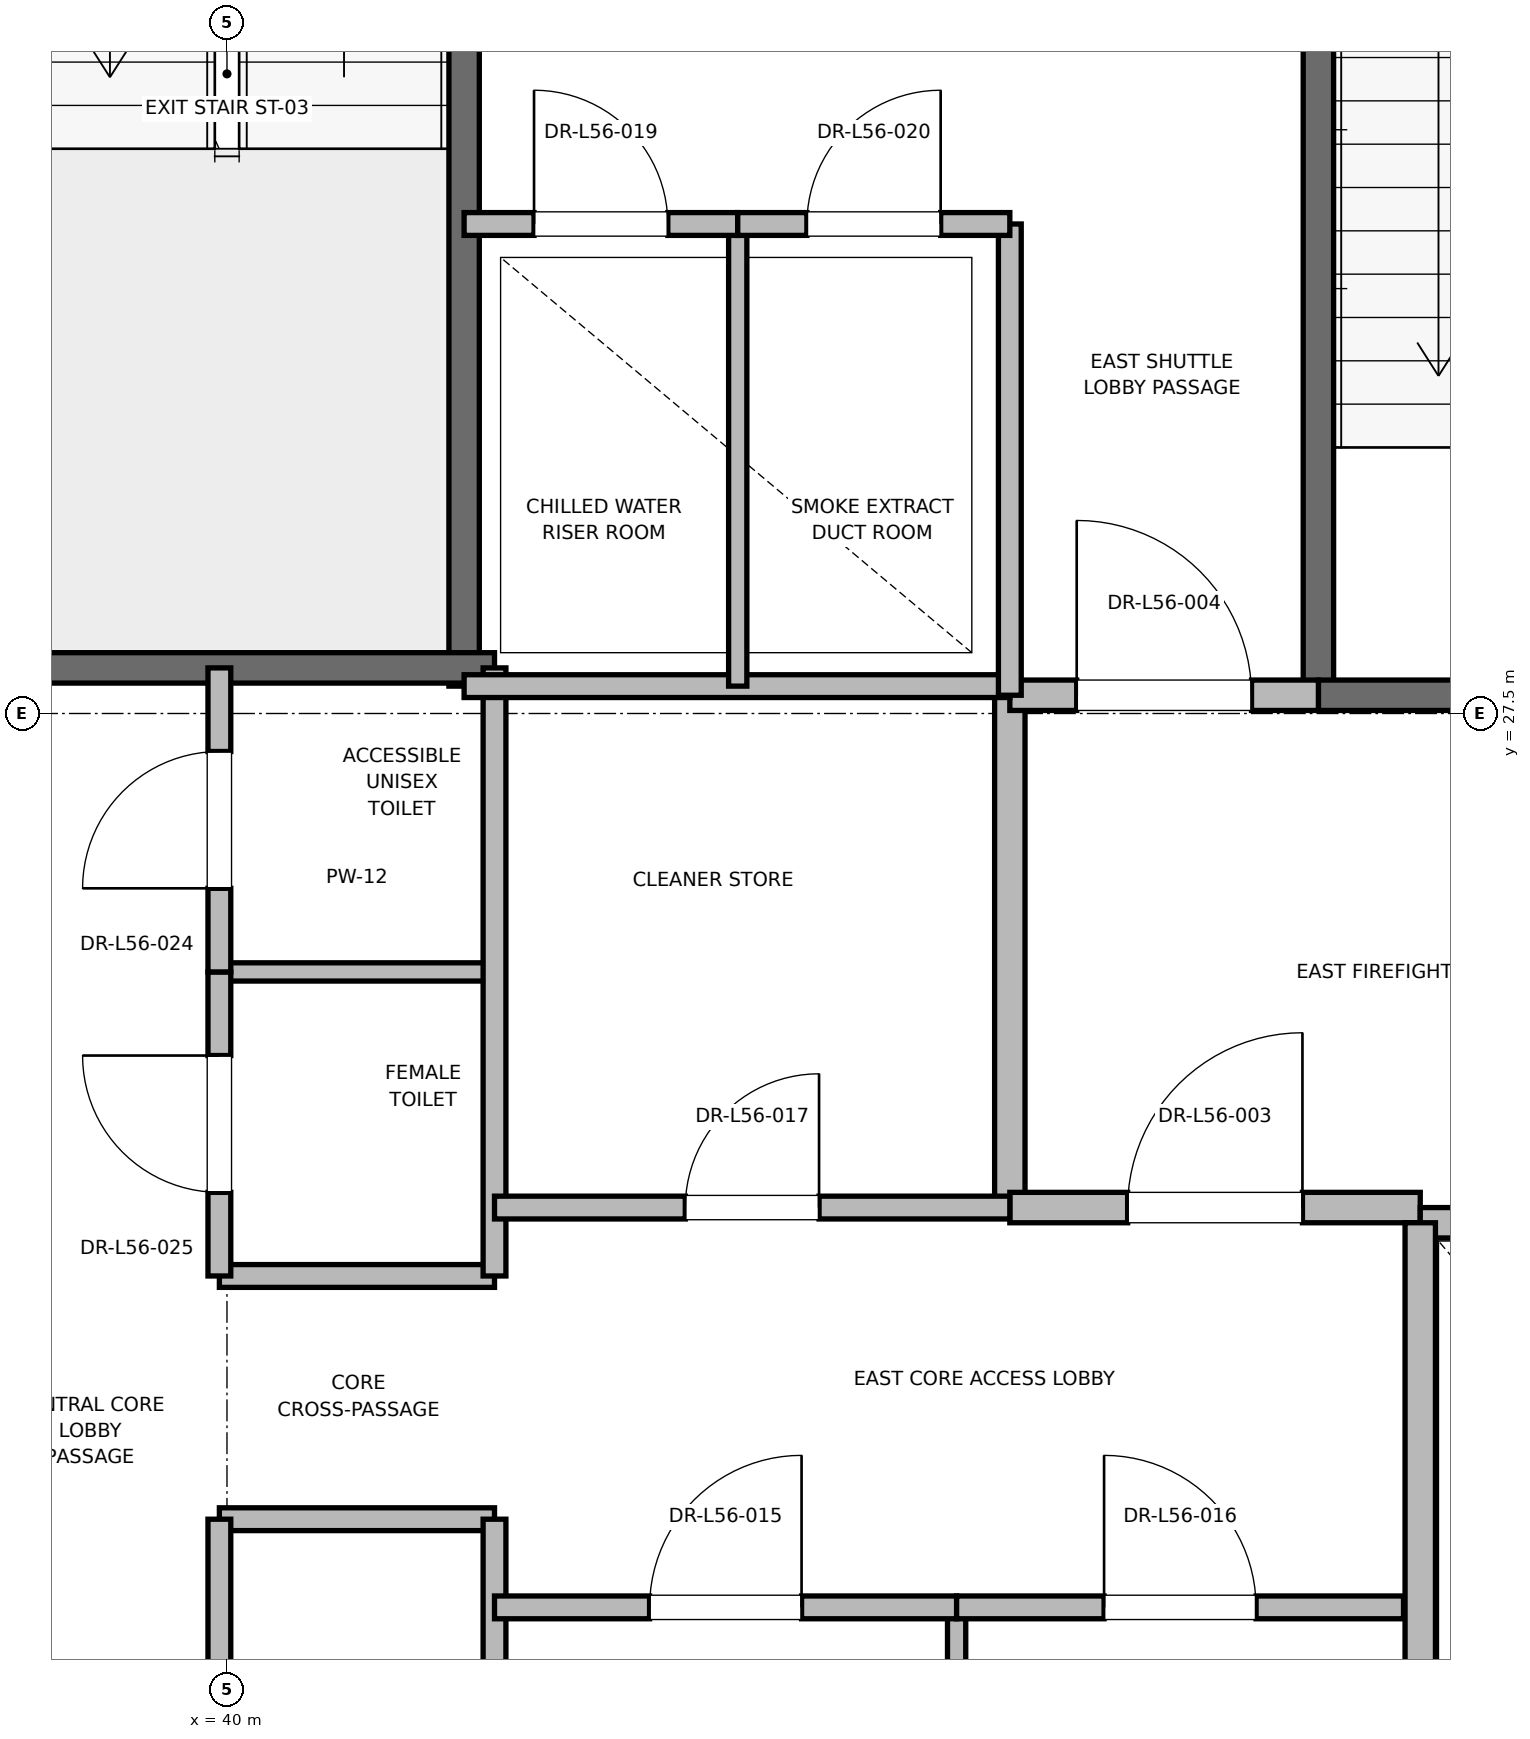
"""IFC4 building model, lengths in metres.
Left out: names, types, materials, properties, quantities, classifications, styles, units other than length and angle.
Written with IfcOpenShell. Run it as: python <this file> out.ifc"""

import sys

from ifc_helpers import new_model, si_unit, direction, frame, frame_2d, origin, place, context, subcontext, project, spatial, rectangle, extrude, element, fill, save


model = new_model("IFC4")
c1 = context("Model", 3, precision=1e-05, world=origin(), true_north=direction((0.0, 1.0)))
c2 = subcontext(c1, "Body", "Model", "MODEL_VIEW")
j1 = project(units=[si_unit("LENGTHUNIT", "METRE"), si_unit("PLANEANGLEUNIT", "RADIAN")], contexts=[c1])
p1 = place(None, origin())
s1 = spatial("IfcSite", under=j1, at=p1, CompositionType="ELEMENT")
p2 = place(p1, origin())
s2 = spatial("IfcBuilding", under=s1, at=p2, CompositionType="ELEMENT")
p3 = place(p2, frame((0.0, 0.0, 243.2)))
s3 = spatial("IfcBuildingStorey", under=s2, at=p3, CompositionType="ELEMENT", Elevation=243.2)
p4 = place(p3, frame((47.18, 27.62, 0.0), z_axis=(0.0, 0.0, 1.0), x_axis=(0.0, 1.0, 0.0)))
e1 = element("IfcWall", 1, at=p4, inside=s3, PredefinedType="SOLIDWALL", context=c2, shape_type="SweptSolid", body=[
    extrude(rectangle(XDim=8.18, YDim=0.2, at=frame_2d((4.09, 0.0))), origin(), (0.0, 0.0, 1.0), 3.785),
])
p5 = place(p3, frame((47.18, 27.62, 0.0), z_axis=(0.0, 0.0, 1.0), x_axis=(1.0, 0.0, 0.0)))
e2 = element("IfcWall", 2, at=p5, inside=s3, PredefinedType="SOLIDWALL", context=c2, shape_type="SweptSolid", body=[
    extrude(rectangle(XDim=3.12, YDim=0.2, at=frame_2d((1.56, 0.0))), origin(), (0.0, 0.0, 1.0), 3.785),
])
p6 = place(p5, frame((1.01, 0.0, 0.0)))
e3 = element("IfcOpeningElement", 3, at=p6, cuts=e2, PredefinedType="OPENING", context=c2, shape_type="SweptSolid", body=[
    extrude(rectangle(XDim=1.1, YDim=2.15, at=frame_2d((0.55, 1.075))), frame((0.0, 0.1, 0.0), z_axis=(0.0, -1.0, 0.0), x_axis=(1.0, 0.0, 0.0)), (0.0, 0.0, 1.0), 0.2),
])
p7 = place(p3, frame((41.56, 27.68, 0.0), z_axis=(0.0, 0.0, 1.0), x_axis=(0.0, 1.0, 0.0)))
e4 = element("IfcWall", 4, at=p7, inside=s3, PredefinedType="SOLIDWALL", context=c2, shape_type="SweptSolid", body=[
    extrude(rectangle(XDim=8.57, YDim=0.2, at=frame_2d((4.285, 0.0))), origin(), (0.0, 0.0, 1.0), 3.785),
])
p8 = place(p3, frame((38.44, 27.8, 0.0), z_axis=(0.0, 0.0, 1.0), x_axis=(1.0, 0.0, 0.0)))
e5 = element("IfcWall", 5, at=p8, inside=s3, PredefinedType="SOLIDWALL", context=c2, shape_type="SweptSolid", body=[
    extrude(rectangle(XDim=3.32, YDim=0.2, at=frame_2d((1.66, 0.0))), origin(), (0.0, 0.0, 1.0), 3.785),
])
p9 = place(p3, frame((45.15, 24.25, 0.0), z_axis=(0.0, 0.0, 1.0), x_axis=(0.0, 1.0, 0.0)))
e6 = element("IfcWall", 6, at=p9, inside=s3, PredefinedType="PARTITIONING", context=c2, shape_type="SweptSolid", body=[
    extrude(rectangle(XDim=3.37, YDim=0.2, at=frame_2d((1.685, 0.0))), origin(), (0.0, 0.0, 1.0), 3.785),
])
p10 = place(p3, frame((45.15, 24.25, 0.0), z_axis=(0.0, 0.0, 1.0), x_axis=(1.0, 0.0, 0.0)))
e7 = element("IfcWall", 7, at=p10, inside=s3, PredefinedType="PARTITIONING", context=c2, shape_type="SweptSolid", body=[
    extrude(rectangle(XDim=2.7, YDim=0.2, at=frame_2d((1.35, 0.0))), origin(), (0.0, 0.0, 1.0), 3.785),
])
p11 = place(p10, frame((0.775, 0.0, 0.0)))
e8 = element("IfcOpeningElement", 8, at=p11, cuts=e7, PredefinedType="OPENING", context=c2, shape_type="SweptSolid", body=[
    extrude(rectangle(XDim=1.15, YDim=2.2, at=frame_2d((0.575, 1.1))), frame((0.0, 0.1, 0.0), z_axis=(0.0, -1.0, 0.0), x_axis=(1.0, 0.0, 0.0)), (0.0, 0.0, 1.0), 0.2),
])
p12 = place(p3, frame((45.15, 27.62, 0.0), z_axis=(0.0, 0.0, 1.0), x_axis=(1.0, 0.0, 0.0)))
e9 = element("IfcWall", 9, at=p12, inside=s3, PredefinedType="PARTITIONING", context=c2, shape_type="SweptSolid", body=[
    extrude(rectangle(XDim=2.03, YDim=0.2, at=frame_2d((1.015, 0.0))), origin(), (0.0, 0.0, 1.0), 3.785),
])
p13 = place(p12, frame((0.44, 0.0, 0.0)))
e10 = element("IfcOpeningElement", 10, at=p13, cuts=e9, PredefinedType="OPENING", context=c2, shape_type="SweptSolid", body=[
    extrude(rectangle(XDim=1.15, YDim=2.2, at=frame_2d((0.575, 1.1))), frame((0.0, 0.1, 0.0), z_axis=(0.0, -1.0, 0.0), x_axis=(1.0, 0.0, 0.0)), (0.0, 0.0, 1.0), 0.2),
])
p14 = place(p3, frame((50.45, 24.15, 0.0), z_axis=(0.0, 0.0, 1.0), x_axis=(-1.0, 0.0, 0.0)))
e11 = element("IfcWall", 11, at=p14, inside=s3, PredefinedType="SOLIDWALL", context=c2, shape_type="SweptSolid", body=[
    extrude(rectangle(XDim=2.6, YDim=0.2, at=frame_2d((1.3, 0.0))), origin(), (0.0, 0.0, 1.0), 2.865),
])
p15 = place(p14, frame((0.75, 0.0, 0.0)))
e12 = element("IfcOpeningElement", 12, at=p15, cuts=e11, PredefinedType="OPENING", context=c2, shape_type="SweptSolid", body=[
    extrude(rectangle(XDim=1.1, YDim=2.2, at=frame_2d((0.55, 1.1))), frame((0.0, 0.1, 0.0), z_axis=(0.0, -1.0, 0.0), x_axis=(1.0, 0.0, 0.0)), (0.0, 0.0, 1.0), 0.2),
])
p16 = place(p3, frame((47.85, 24.15, 0.0), z_axis=(0.0, 0.0, 1.0), x_axis=(0.0, -1.0, 0.0)))
e13 = element("IfcWall", 13, at=p16, inside=s3, PredefinedType="SOLIDWALL", context=c2, shape_type="SweptSolid", body=[
    extrude(rectangle(XDim=3.0, YDim=0.2, at=frame_2d((1.5, 0.0))), origin(), (0.0, 0.0, 1.0), 3.785),
])
for number, where, z_axis, x_axis in (
    (14, (39.95, 22.2, 0.0), (0.0, 0.0, 1.0), (1.0, 0.0, 0.0)),
    (15, (39.95, 23.8, 0.0), (0.0, 0.0, 1.0), (1.0, 0.0, 0.0)),
):
    element("IfcWall", number, at=place(p3, frame(where, z_axis=z_axis, x_axis=x_axis)), inside=s3, PredefinedType="PARTITIONING", context=c2, shape_type="SweptSolid", body=[
        extrude(rectangle(XDim=1.81, YDim=0.15, at=frame_2d((0.905, 0.0))), origin(), (0.0, 0.0, 1.0), 2.85),
    ])
p17 = place(p3, frame((39.95, 25.8, 0.0), z_axis=(0.0, 0.0, 1.0), x_axis=(1.0, 0.0, 0.0)))
e16 = element("IfcWall", 16, at=p17, inside=s3, PredefinedType="PARTITIONING", context=c2, shape_type="SweptSolid", body=[
    extrude(rectangle(XDim=1.81, YDim=0.12, at=frame_2d((0.905, 0.0))), origin(), (0.0, 0.0, 1.0), 2.85),
])
p18 = place(p3, frame((41.76, 18.6, 0.0), z_axis=(0.0, 0.0, 1.0), x_axis=(0.0, 1.0, 0.0)))
e17 = element("IfcWall", 17, at=p18, inside=s3, PredefinedType="PARTITIONING", context=c2, shape_type="SweptSolid", body=[
    extrude(rectangle(XDim=3.6, YDim=0.15, at=frame_2d((1.8, 0.0))), origin(), (0.0, 0.0, 1.0), 2.85),
])
p19 = place(p3, frame((41.76, 23.8, 0.0), z_axis=(0.0, 0.0, 1.0), x_axis=(0.0, 1.0, 0.0)))
e18 = element("IfcWall", 18, at=p19, inside=s3, PredefinedType="PARTITIONING", context=c2, shape_type="SweptSolid", body=[
    extrude(rectangle(XDim=4.0, YDim=0.15, at=frame_2d((2.0, 0.0))), origin(), (0.0, 0.0, 1.0), 2.85),
])
p20 = place(p3, frame((39.95, 19.2, 0.0), z_axis=(0.0, 0.0, 1.0), x_axis=(0.0, 1.0, 0.0)))
e19 = element("IfcWall", 19, at=p20, inside=s3, PredefinedType="PARTITIONING", context=c2, shape_type="SweptSolid", body=[
    extrude(rectangle(XDim=3.0, YDim=0.15, at=frame_2d((1.5, 0.0))), origin(), (0.0, 0.0, 1.0), 2.85),
])
p21 = place(p20, frame((1.05, 0.0, 0.0)))
e20 = element("IfcOpeningElement", 20, at=p21, cuts=e19, PredefinedType="OPENING", context=c2, shape_type="SweptSolid", body=[
    extrude(rectangle(XDim=0.9, YDim=2.1, at=frame_2d((0.45, 1.05))), frame((0.0, 0.075, 0.0), z_axis=(0.0, -1.0, 0.0), x_axis=(1.0, 0.0, 0.0)), (0.0, 0.0, 1.0), 0.15),
])
p22 = place(p3, frame((39.95, 23.8, 0.0), z_axis=(0.0, 0.0, 1.0), x_axis=(0.0, 1.0, 0.0)))
e21 = element("IfcWall", 21, at=p22, inside=s3, PredefinedType="PARTITIONING", context=c2, shape_type="SweptSolid", body=[
    extrude(rectangle(XDim=2.0, YDim=0.15, at=frame_2d((1.0, 0.0))), origin(), (0.0, 0.0, 1.0), 2.85),
])
p23 = place(p22, frame((0.55, 0.0, 0.0)))
e22 = element("IfcOpeningElement", 22, at=p23, cuts=e21, PredefinedType="OPENING", context=c2, shape_type="SweptSolid", body=[
    extrude(rectangle(XDim=0.9, YDim=2.1, at=frame_2d((0.45, 1.05))), frame((0.0, 0.075, 0.0), z_axis=(0.0, -1.0, 0.0), x_axis=(1.0, 0.0, 0.0)), (0.0, 0.0, 1.0), 0.15),
])
p24 = place(p3, frame((39.95, 25.8, 0.0), z_axis=(0.0, 0.0, 1.0), x_axis=(0.0, 1.0, 0.0)))
e23 = element("IfcWall", 23, at=p24, inside=s3, PredefinedType="PARTITIONING", context=c2, shape_type="SweptSolid", body=[
    extrude(rectangle(XDim=2.0, YDim=0.15, at=frame_2d((1.0, 0.0))), origin(), (0.0, 0.0, 1.0), 2.85),
])
p25 = place(p24, frame((0.55, 0.0, 0.0)))
e24 = element("IfcOpeningElement", 24, at=p25, cuts=e23, PredefinedType="OPENING", context=c2, shape_type="SweptSolid", body=[
    extrude(rectangle(XDim=0.9, YDim=2.1, at=frame_2d((0.45, 1.05))), frame((0.0, 0.075, 0.0), z_axis=(0.0, -1.0, 0.0), x_axis=(1.0, 0.0, 0.0)), (0.0, 0.0, 1.0), 0.15),
])
p26 = place(p3, frame((41.56, 27.68, 0.0), z_axis=(0.0, 0.0, 1.0), x_axis=(1.0, 0.0, 0.0)))
e25 = element("IfcWall", 25, at=p26, inside=s3, PredefinedType="PARTITIONING", context=c2, shape_type="SweptSolid", body=[
    extrude(rectangle(XDim=3.59, YDim=0.15, at=frame_2d((1.795, 0.0))), origin(), (0.0, 0.0, 1.0), 2.85),
])
p27 = place(p3, frame((44.8, 18.6, 0.0), z_axis=(0.0, 0.0, 1.0), x_axis=(0.0, 1.0, 0.0)))
e26 = element("IfcWall", 26, at=p27, inside=s3, PredefinedType="PARTITIONING", context=c2, shape_type="SweptSolid", body=[
    extrude(rectangle(XDim=3.02, YDim=0.12, at=frame_2d((1.51, 0.0))), origin(), (0.0, 0.0, 1.0), 2.85),
])
p28 = place(p3, frame((41.76, 21.62, 0.0), z_axis=(0.0, 0.0, 1.0), x_axis=(1.0, 0.0, 0.0)))
e27 = element("IfcWall", 27, at=p28, inside=s3, PredefinedType="PARTITIONING", context=c2, shape_type="SweptSolid", body=[
    extrude(rectangle(XDim=3.04, YDim=0.15, at=frame_2d((1.52, 0.0))), origin(), (0.0, 0.0, 1.0), 2.85),
])
p29 = place(p28, frame((1.02, 0.0, 0.0)))
e28 = element("IfcOpeningElement", 28, at=p29, cuts=e27, PredefinedType="OPENING", context=c2, shape_type="SweptSolid", body=[
    extrude(rectangle(XDim=1.0, YDim=2.15, at=frame_2d((0.5, 1.075))), frame((0.0, 0.075, 0.0), z_axis=(0.0, -1.0, 0.0), x_axis=(1.0, 0.0, 0.0)), (0.0, 0.0, 1.0), 0.15),
])
p30 = place(p3, frame((44.8, 21.62, 0.0), z_axis=(0.0, 0.0, 1.0), x_axis=(1.0, 0.0, 0.0)))
e29 = element("IfcWall", 29, at=p30, inside=s3, PredefinedType="PARTITIONING", context=c2, shape_type="SweptSolid", body=[
    extrude(rectangle(XDim=2.94, YDim=0.15, at=frame_2d((1.47, 0.0))), origin(), (0.0, 0.0, 1.0), 2.85),
])
p31 = place(p30, frame((0.97, 0.0, 0.0)))
e30 = element("IfcOpeningElement", 30, at=p31, cuts=e29, PredefinedType="OPENING", context=c2, shape_type="SweptSolid", body=[
    extrude(rectangle(XDim=1.0, YDim=2.15, at=frame_2d((0.5, 1.075))), frame((0.0, 0.075, 0.0), z_axis=(0.0, -1.0, 0.0), x_axis=(1.0, 0.0, 0.0)), (0.0, 0.0, 1.0), 0.15),
])
p32 = place(p3, frame((41.76, 24.25, 0.0), z_axis=(0.0, 0.0, 1.0), x_axis=(1.0, 0.0, 0.0)))
e31 = element("IfcWall", 31, at=p32, inside=s3, PredefinedType="PARTITIONING", context=c2, shape_type="SweptSolid", body=[
    extrude(rectangle(XDim=3.39, YDim=0.15, at=frame_2d((1.695, 0.0))), origin(), (0.0, 0.0, 1.0), 2.85),
])
p33 = place(p32, frame((1.255, 0.0, 0.0)))
e32 = element("IfcOpeningElement", 32, at=p33, cuts=e31, PredefinedType="OPENING", context=c2, shape_type="SweptSolid", body=[
    extrude(rectangle(XDim=0.88, YDim=2.1, at=frame_2d((0.44, 1.05))), frame((0.0, 0.075, 0.0), z_axis=(0.0, -1.0, 0.0), x_axis=(1.0, 0.0, 0.0)), (0.0, 0.0, 1.0), 0.15),
])
p34 = place(p3, frame((45.15, 27.62, 0.0), z_axis=(0.0, 0.0, 1.0), x_axis=(0.0, 1.0, 0.0)))
e33 = element("IfcWall", 33, at=p34, inside=s3, PredefinedType="PARTITIONING", context=c2, shape_type="SweptSolid", body=[
    extrude(rectangle(XDim=3.1, YDim=0.15, at=frame_2d((1.55, 0.0))), origin(), (0.0, 0.0, 1.0), 2.85),
])
p35 = place(p3, frame((43.36, 27.68, 0.0), z_axis=(0.0, 0.0, 1.0), x_axis=(0.0, 1.0, 0.0)))
e34 = element("IfcWall", 34, at=p35, inside=s3, PredefinedType="PARTITIONING", context=c2, shape_type="SweptSolid", body=[
    extrude(rectangle(XDim=3.04, YDim=0.12, at=frame_2d((1.52, 0.0))), origin(), (0.0, 0.0, 1.0), 2.85),
])
p36 = place(p3, frame((41.56, 30.72, 0.0), z_axis=(0.0, 0.0, 1.0), x_axis=(1.0, 0.0, 0.0)))
e35 = element("IfcWall", 35, at=p36, inside=s3, PredefinedType="PARTITIONING", context=c2, shape_type="SweptSolid", body=[
    extrude(rectangle(XDim=1.8, YDim=0.15, at=frame_2d((0.9, 0.0))), origin(), (0.0, 0.0, 1.0), 2.85),
])
p37 = place(p36, frame((0.46, 0.0, 0.0)))
e36 = element("IfcOpeningElement", 36, at=p37, cuts=e35, PredefinedType="OPENING", context=c2, shape_type="SweptSolid", body=[
    extrude(rectangle(XDim=0.88, YDim=2.1, at=frame_2d((0.44, 1.05))), frame((0.0, 0.075, 0.0), z_axis=(0.0, -1.0, 0.0), x_axis=(1.0, 0.0, 0.0)), (0.0, 0.0, 1.0), 0.15),
])
p38 = place(p3, frame((43.36, 30.72, 0.0), z_axis=(0.0, 0.0, 1.0), x_axis=(1.0, 0.0, 0.0)))
e37 = element("IfcWall", 37, at=p38, inside=s3, PredefinedType="PARTITIONING", context=c2, shape_type="SweptSolid", body=[
    extrude(rectangle(XDim=1.79, YDim=0.15, at=frame_2d((0.895, 0.0))), origin(), (0.0, 0.0, 1.0), 2.85),
])
p39 = place(p38, frame((0.455, 0.0, 0.0)))
e38 = element("IfcOpeningElement", 38, at=p39, cuts=e37, PredefinedType="OPENING", context=c2, shape_type="SweptSolid", body=[
    extrude(rectangle(XDim=0.88, YDim=2.1, at=frame_2d((0.44, 1.05))), frame((0.0, 0.075, 0.0), z_axis=(0.0, -1.0, 0.0), x_axis=(1.0, 0.0, 0.0)), (0.0, 0.0, 1.0), 0.15),
])
p40 = place(p11, origin())
e39 = element("IfcDoor", 39, at=p40, inside=s3, OperationType="SINGLE_SWING_RIGHT", PredefinedType="DOOR", context=c2, shape_type="SweptSolid", body=[
    extrude(rectangle(XDim=1.15, YDim=2.2, at=frame_2d((0.575, 1.1))), frame((0.0, 0.025, 0.0), z_axis=(0.0, -1.0, 0.0), x_axis=(1.0, 0.0, 0.0)), (0.0, 0.0, 1.0), 0.05),
])
fill(e8, e39)
p41 = place(p13, origin())
e40 = element("IfcDoor", 40, at=p41, inside=s3, OperationType="SINGLE_SWING_LEFT", PredefinedType="DOOR", context=c2, shape_type="SweptSolid", body=[
    extrude(rectangle(XDim=1.15, YDim=2.2, at=frame_2d((0.575, 1.1))), frame((0.0, 0.025, 0.0), z_axis=(0.0, -1.0, 0.0), x_axis=(1.0, 0.0, 0.0)), (0.0, 0.0, 1.0), 0.05),
])
fill(e10, e40)
p42 = place(p23, origin())
e41 = element("IfcDoor", 41, at=p42, inside=s3, OperationType="SINGLE_SWING_RIGHT", PredefinedType="DOOR", context=c2, shape_type="SweptSolid", body=[
    extrude(rectangle(XDim=0.9, YDim=2.1, at=frame_2d((0.45, 1.05))), frame((0.0, 0.025, 0.0), z_axis=(0.0, -1.0, 0.0), x_axis=(1.0, 0.0, 0.0)), (0.0, 0.0, 1.0), 0.05),
])
fill(e22, e41)
p43 = place(p25, origin())
e42 = element("IfcDoor", 42, at=p43, inside=s3, OperationType="SINGLE_SWING_LEFT", PredefinedType="DOOR", context=c2, shape_type="SweptSolid", body=[
    extrude(rectangle(XDim=0.9, YDim=2.1, at=frame_2d((0.45, 1.05))), frame((0.0, 0.025, 0.0), z_axis=(0.0, -1.0, 0.0), x_axis=(1.0, 0.0, 0.0)), (0.0, 0.0, 1.0), 0.05),
])
fill(e24, e42)
p44 = place(p29, origin())
e43 = element("IfcDoor", 43, at=p44, inside=s3, OperationType="SINGLE_SWING_RIGHT", PredefinedType="DOOR", context=c2, shape_type="SweptSolid", body=[
    extrude(rectangle(XDim=1.0, YDim=2.15, at=frame_2d((0.5, 1.075))), frame((0.0, 0.025, 0.0), z_axis=(0.0, -1.0, 0.0), x_axis=(1.0, 0.0, 0.0)), (0.0, 0.0, 1.0), 0.05),
])
fill(e28, e43)
p45 = place(p31, origin())
e44 = element("IfcDoor", 44, at=p45, inside=s3, OperationType="SINGLE_SWING_LEFT", PredefinedType="DOOR", context=c2, shape_type="SweptSolid", body=[
    extrude(rectangle(XDim=1.0, YDim=2.15, at=frame_2d((0.5, 1.075))), frame((0.0, 0.025, 0.0), z_axis=(0.0, -1.0, 0.0), x_axis=(1.0, 0.0, 0.0)), (0.0, 0.0, 1.0), 0.05),
])
fill(e30, e44)
p46 = place(p33, origin())
e45 = element("IfcDoor", 45, at=p46, inside=s3, OperationType="SINGLE_SWING_RIGHT", PredefinedType="DOOR", context=c2, shape_type="SweptSolid", body=[
    extrude(rectangle(XDim=0.88, YDim=2.1, at=frame_2d((0.44, 1.05))), frame((0.0, 0.025, 0.0), z_axis=(0.0, -1.0, 0.0), x_axis=(1.0, 0.0, 0.0)), (0.0, 0.0, 1.0), 0.05),
])
fill(e32, e45)
p47 = place(p37, origin())
e46 = element("IfcDoor", 46, at=p47, inside=s3, OperationType="SINGLE_SWING_LEFT", PredefinedType="DOOR", context=c2, shape_type="SweptSolid", body=[
    extrude(rectangle(XDim=0.88, YDim=2.1, at=frame_2d((0.44, 1.05))), frame((0.0, 0.025, 0.0), z_axis=(0.0, -1.0, 0.0), x_axis=(1.0, 0.0, 0.0)), (0.0, 0.0, 1.0), 0.05),
])
fill(e36, e46)
p48 = place(p39, origin())
e47 = element("IfcDoor", 47, at=p48, inside=s3, OperationType="SINGLE_SWING_RIGHT", PredefinedType="DOOR", context=c2, shape_type="SweptSolid", body=[
    extrude(rectangle(XDim=0.88, YDim=2.1, at=frame_2d((0.44, 1.05))), frame((0.0, 0.025, 0.0), z_axis=(0.0, -1.0, 0.0), x_axis=(1.0, 0.0, 0.0)), (0.0, 0.0, 1.0), 0.05),
])
fill(e38, e47)
save(model, sys.argv[1])
